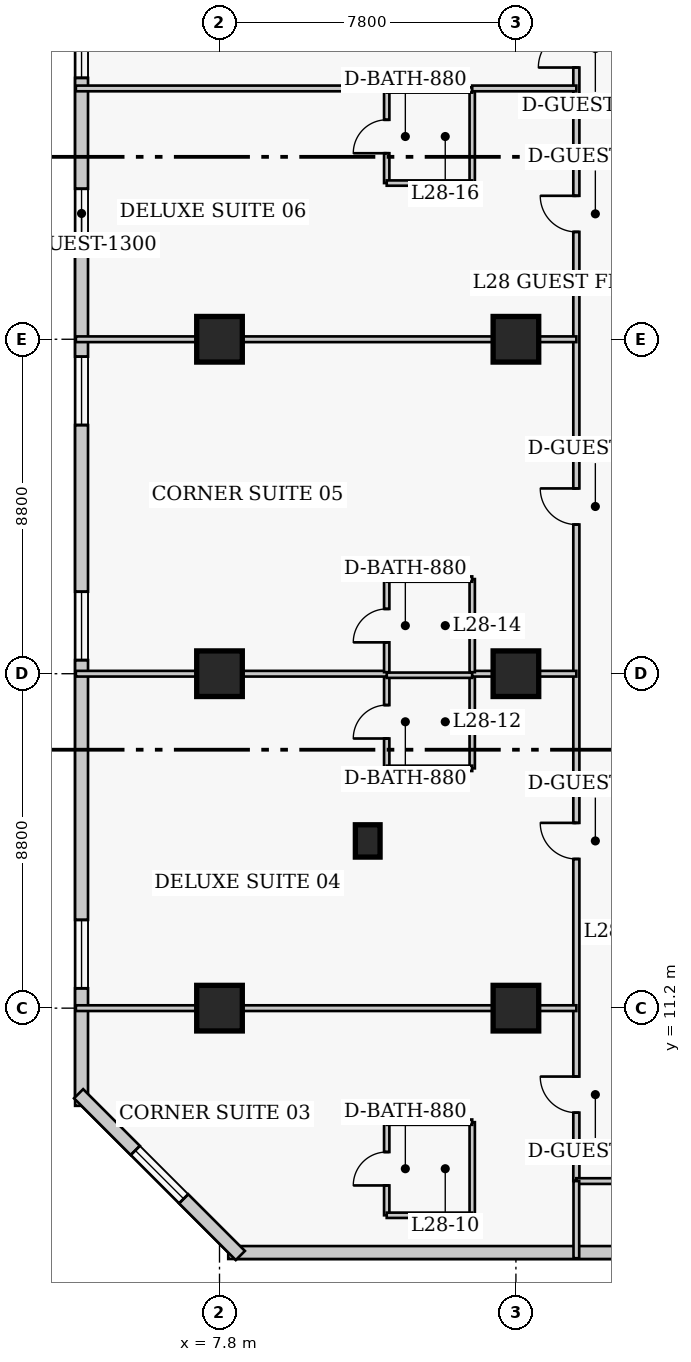
"""IFC4 building model, lengths in metres.
Left out: names, types, materials, properties, quantities, classifications, styles, units other than length and angle.
Written with IfcOpenShell. Run it as: python <this file> out.ifc"""

import sys

from ifc_helpers import new_model, si_unit, direction, frame, frame_2d, origin, origin_2d, place, context, subcontext, project, spatial, rectangle, extrude, element, fill, save


model = new_model("IFC4")
c1 = context("Model", 3, precision=1e-05, world=origin(), true_north=direction((0.0, 1.0)))
c2 = subcontext(c1, "Body", "Model", "MODEL_VIEW")
j1 = project(units=[si_unit("LENGTHUNIT", "METRE"), si_unit("PLANEANGLEUNIT", "RADIAN")], contexts=[c1])
p1 = place(None, origin())
s1 = spatial("IfcSite", under=j1, at=p1, CompositionType="ELEMENT")
p2 = place(p1, origin())
s2 = spatial("IfcBuilding", under=s1, at=p2, CompositionType="ELEMENT")
p3 = place(p2, frame((0.0, 0.0, 114.6)))
s3 = spatial("IfcBuildingStorey", under=s2, at=p3, CompositionType="ELEMENT", Elevation=114.6)
for number, where, z_axis, x_axis in (
    (1, (7.8, 11.2, 0.0), (0.0, 0.0, 1.0), (1.0, 0.0, 0.0)),
    (2, (7.8, 20.0, 0.0), (0.0, 0.0, 1.0), (1.0, 0.0, 0.0)),
    (3, (7.8, 28.8, 0.0), (0.0, 0.0, 1.0), (1.0, 0.0, 0.0)),
    (4, (15.6, 11.2, 0.0), (0.0, 0.0, 1.0), (1.0, 0.0, 0.0)),
    (5, (15.6, 20.0, 0.0), (0.0, 0.0, 1.0), (1.0, 0.0, 0.0)),
    (6, (15.6, 28.8, 0.0), (0.0, 0.0, 1.0), (1.0, 0.0, 0.0)),
):
    element("IfcColumn", number, at=place(p3, frame(where, z_axis=z_axis, x_axis=x_axis)), inside=s3, PredefinedType="COLUMN", context=c2, shape_type="SweptSolid", body=[
        extrude(rectangle(XDim=1.2, YDim=1.2, at=origin_2d()), origin(), (0.0, 0.0, 1.0), 3.8),
    ])
p4 = place(p3, frame((11.7, 15.6, 0.0), z_axis=(0.0, 0.0, 1.0), x_axis=(1.0, 0.0, 0.0)))
e7 = element("IfcColumn", 7, at=p4, inside=s3, PredefinedType="PILASTER", context=c2, shape_type="SweptSolid", body=[
    extrude(rectangle(XDim=0.65, YDim=0.85, at=origin_2d()), origin(), (0.0, 0.0, 1.0), 3.8),
])
p5 = place(p3, frame((8.03, 4.77, 0.0), z_axis=(0.0, 0.0, 1.0), x_axis=(1.0, 0.0, 0.0)))
e8 = element("IfcWall", 8, at=p5, inside=s3, PredefinedType="SOLIDWALL", context=c2, shape_type="SweptSolid", body=[
    extrude(rectangle(XDim=28.29, YDim=0.34, at=frame_2d((14.145, 0.0))), origin(), (0.0, 0.0, 1.0), 3.54),
])
p6 = place(p5, frame((12.595, 0.0, 0.85)))
e9 = element("IfcOpeningElement", 9, at=p6, cuts=e8, PredefinedType="OPENING", context=c2, shape_type="SweptSolid", body=[
    extrude(rectangle(XDim=1.8, YDim=1.8, at=frame_2d((0.9, 0.9))), frame((0.0, 0.18, 0.0), z_axis=(0.0, -1.0, 0.0), x_axis=(1.0, 0.0, 0.0)), (0.0, 0.0, 1.0), 0.36),
])
p7 = place(p3, frame((4.17, 40.57, 0.0), z_axis=(0.0, 0.0, 1.0), x_axis=(0.0, -1.0, 0.0)))
e10 = element("IfcWall", 10, at=p7, inside=s3, PredefinedType="SOLIDWALL", context=c2, shape_type="SweptSolid", body=[
    extrude(rectangle(XDim=31.94, YDim=0.34, at=frame_2d((15.97, 0.0))), origin(), (0.0, 0.0, 1.0), 3.54),
])
p8 = place(p7, frame((3.093, 0.0, 0.85)))
e11 = element("IfcOpeningElement", 11, at=p8, cuts=e10, PredefinedType="OPENING", context=c2, shape_type="SweptSolid", body=[
    extrude(rectangle(XDim=1.8, YDim=1.8, at=frame_2d((0.9, 0.9))), frame((0.0, 0.18, 0.0), z_axis=(0.0, -1.0, 0.0), x_axis=(1.0, 0.0, 0.0)), (0.0, 0.0, 1.0), 0.36),
])
p9 = place(p7, frame((12.228, 0.0, 0.85)))
e12 = element("IfcOpeningElement", 12, at=p9, cuts=e10, PredefinedType="OPENING", context=c2, shape_type="SweptSolid", body=[
    extrude(rectangle(XDim=1.8, YDim=1.8, at=frame_2d((0.9, 0.9))), frame((0.0, 0.18, 0.0), z_axis=(0.0, -1.0, 0.0), x_axis=(1.0, 0.0, 0.0)), (0.0, 0.0, 1.0), 0.36),
])
p10 = place(p7, frame((18.413, 0.0, 0.85)))
e13 = element("IfcOpeningElement", 13, at=p10, cuts=e10, PredefinedType="OPENING", context=c2, shape_type="SweptSolid", body=[
    extrude(rectangle(XDim=1.8, YDim=1.8, at=frame_2d((0.9, 0.9))), frame((0.0, 0.18, 0.0), z_axis=(0.0, -1.0, 0.0), x_axis=(1.0, 0.0, 0.0)), (0.0, 0.0, 1.0), 0.36),
])
p11 = place(p7, frame((27.048, 0.0, 0.85)))
e14 = element("IfcOpeningElement", 14, at=p11, cuts=e10, PredefinedType="OPENING", context=c2, shape_type="SweptSolid", body=[
    extrude(rectangle(XDim=1.8, YDim=1.8, at=frame_2d((0.9, 0.9))), frame((0.0, 0.18, 0.0), z_axis=(0.0, -1.0, 0.0), x_axis=(1.0, 0.0, 0.0)), (0.0, 0.0, 1.0), 0.36),
])
p12 = place(p7, frame((7.81, 0.0, 0.85)))
e15 = element("IfcOpeningElement", 15, at=p12, cuts=e10, PredefinedType="OPENING", context=c2, shape_type="SweptSolid", body=[
    extrude(rectangle(XDim=1.3, YDim=1.7, at=frame_2d((0.65, 0.85))), frame((0.0, 0.18, 0.0), z_axis=(0.0, -1.0, 0.0), x_axis=(1.0, 0.0, 0.0)), (0.0, 0.0, 1.0), 0.36),
])
p13 = place(p3, frame((4.092, 8.948, 0.0), z_axis=(0.0, 0.0, 1.0), x_axis=(0.707106781187, -0.707106781187, 0.0)))
e16 = element("IfcWall", 16, at=p13, inside=s3, PredefinedType="SOLIDWALL", context=c2, shape_type="SweptSolid", body=[
    extrude(rectangle(XDim=6.02, YDim=0.34, at=frame_2d((3.01, 0.0))), origin(), (0.0, 0.0, 1.0), 3.54),
])
p14 = place(p13, frame((2.11, 0.0, 0.85)))
e17 = element("IfcOpeningElement", 17, at=p14, cuts=e16, PredefinedType="OPENING", context=c2, shape_type="SweptSolid", body=[
    extrude(rectangle(XDim=1.8, YDim=1.8, at=frame_2d((0.9, 0.9))), frame((0.0, 0.18, 0.0), z_axis=(0.0, -1.0, 0.0), x_axis=(1.0, 0.0, 0.0)), (0.0, 0.0, 1.0), 0.36),
])
p15 = place(p3, frame((17.19, 6.65, 0.0), z_axis=(0.0, 0.0, 1.0), x_axis=(0.0, 1.0, 0.0)))
e18 = element("IfcWall", 18, at=p15, inside=s3, PredefinedType="PARTITIONING", context=c2, shape_type="SweptSolid", body=[
    extrude(rectangle(XDim=34.0, YDim=0.16, at=frame_2d((17.0, 0.0))), origin(), (0.0, 0.0, 1.0), 3.54),
])
p16 = place(p15, frame((1.8, 0.0, 0.0)))
e19 = element("IfcOpeningElement", 19, at=p16, cuts=e18, PredefinedType="OPENING", context=c2, shape_type="SweptSolid", body=[
    extrude(rectangle(XDim=0.95, YDim=2.1, at=frame_2d((0.475, 1.05))), frame((0.0, 0.09, 0.0), z_axis=(0.0, -1.0, 0.0), x_axis=(1.0, 0.0, 0.0)), (0.0, 0.0, 1.0), 0.18),
])
p17 = place(p15, frame((8.475, 0.0, 0.0)))
e20 = element("IfcOpeningElement", 20, at=p17, cuts=e18, PredefinedType="OPENING", context=c2, shape_type="SweptSolid", body=[
    extrude(rectangle(XDim=0.95, YDim=2.1, at=frame_2d((0.475, 1.05))), frame((0.0, 0.09, 0.0), z_axis=(0.0, -1.0, 0.0), x_axis=(1.0, 0.0, 0.0)), (0.0, 0.0, 1.0), 0.18),
])
p18 = place(p15, frame((17.275, 0.0, 0.0)))
e21 = element("IfcOpeningElement", 21, at=p18, cuts=e18, PredefinedType="OPENING", context=c2, shape_type="SweptSolid", body=[
    extrude(rectangle(XDim=0.95, YDim=2.1, at=frame_2d((0.475, 1.05))), frame((0.0, 0.09, 0.0), z_axis=(0.0, -1.0, 0.0), x_axis=(1.0, 0.0, 0.0)), (0.0, 0.0, 1.0), 0.18),
])
p19 = place(p15, frame((24.975, 0.0, 0.0)))
e22 = element("IfcOpeningElement", 22, at=p19, cuts=e18, PredefinedType="OPENING", context=c2, shape_type="SweptSolid", body=[
    extrude(rectangle(XDim=0.95, YDim=2.1, at=frame_2d((0.475, 1.05))), frame((0.0, 0.09, 0.0), z_axis=(0.0, -1.0, 0.0), x_axis=(1.0, 0.0, 0.0)), (0.0, 0.0, 1.0), 0.18),
])
p20 = place(p15, frame((29.3, 0.0, 0.0)))
e23 = element("IfcOpeningElement", 23, at=p20, cuts=e18, PredefinedType="OPENING", context=c2, shape_type="SweptSolid", body=[
    extrude(rectangle(XDim=1.0, YDim=2.15, at=frame_2d((0.5, 1.075))), frame((0.0, 0.09, 0.0), z_axis=(0.0, -1.0, 0.0), x_axis=(1.0, 0.0, 0.0)), (0.0, 0.0, 1.0), 0.18),
])
p21 = place(p3, frame((17.19, 6.65, 0.0), z_axis=(0.0, 0.0, 1.0), x_axis=(1.0, 0.0, 0.0)))
e24 = element("IfcWall", 24, at=p21, inside=s3, PredefinedType="PARTITIONING", context=c2, shape_type="SweptSolid", body=[
    extrude(rectangle(XDim=2.22, YDim=0.15, at=frame_2d((1.11, 0.0))), origin(), (0.0, 0.0, 1.0), 3.54),
])
p22 = place(p3, frame((17.19, 4.62, 0.0), z_axis=(0.0, 0.0, 1.0), x_axis=(0.0, 1.0, 0.0)))
e25 = element("IfcWall", 25, at=p22, inside=s3, PredefinedType="PARTITIONING", context=c2, shape_type="SweptSolid", body=[
    extrude(rectangle(XDim=2.03, YDim=0.15, at=frame_2d((1.015, 0.0))), origin(), (0.0, 0.0, 1.0), 3.54),
])
p23 = place(p3, frame((12.2, 5.75, 0.0), z_axis=(0.0, 0.0, 1.0), x_axis=(0.0, 1.0, 0.0)))
e26 = element("IfcWall", 26, at=p23, inside=s3, PredefinedType="PLUMBINGWALL", context=c2, shape_type="SweptSolid", body=[
    extrude(rectangle(XDim=2.45, YDim=0.14, at=frame_2d((1.225, 0.0))), origin(), (0.0, 0.0, 1.0), 3.54),
])
p24 = place(p23, frame((0.785, 0.0, 0.0)))
e27 = element("IfcOpeningElement", 27, at=p24, cuts=e26, PredefinedType="OPENING", context=c2, shape_type="SweptSolid", body=[
    extrude(rectangle(XDim=0.88, YDim=2.05, at=frame_2d((0.44, 1.025))), frame((0.0, 0.08, 0.0), z_axis=(0.0, -1.0, 0.0), x_axis=(1.0, 0.0, 0.0)), (0.0, 0.0, 1.0), 0.16),
])
p25 = place(p3, frame((14.45, 5.75, 0.0), z_axis=(0.0, 0.0, 1.0), x_axis=(0.0, 1.0, 0.0)))
e28 = element("IfcWall", 28, at=p25, inside=s3, PredefinedType="PLUMBINGWALL", context=c2, shape_type="SweptSolid", body=[
    extrude(rectangle(XDim=2.45, YDim=0.14, at=frame_2d((1.225, 0.0))), origin(), (0.0, 0.0, 1.0), 3.54),
])
for number, where, z_axis, x_axis in (
    (29, (12.2, 5.75, 0.0), (0.0, 0.0, 1.0), (1.0, 0.0, 0.0)),
    (30, (12.2, 8.2, 0.0), (0.0, 0.0, 1.0), (1.0, 0.0, 0.0)),
):
    element("IfcWall", number, at=place(p3, frame(where, z_axis=z_axis, x_axis=x_axis)), inside=s3, PredefinedType="PLUMBINGWALL", context=c2, shape_type="SweptSolid", body=[
        extrude(rectangle(XDim=2.25, YDim=0.14, at=frame_2d((1.125, 0.0))), origin(), (0.0, 0.0, 1.0), 3.54),
    ])
p26 = place(p3, frame((4.02, 11.2, 0.0), z_axis=(0.0, 0.0, 1.0), x_axis=(1.0, 0.0, 0.0)))
e31 = element("IfcWall", 31, at=p26, inside=s3, PredefinedType="PARTITIONING", context=c2, shape_type="SweptSolid", body=[
    extrude(rectangle(XDim=13.17, YDim=0.15, at=frame_2d((6.585, 0.0))), origin(), (0.0, 0.0, 1.0), 2.679),
])
p27 = place(p3, frame((12.2, 17.51, 0.0), z_axis=(0.0, 0.0, 1.0), x_axis=(0.0, 1.0, 0.0)))
e32 = element("IfcWall", 32, at=p27, inside=s3, PredefinedType="PLUMBINGWALL", context=c2, shape_type="SweptSolid", body=[
    extrude(rectangle(XDim=2.45, YDim=0.14, at=frame_2d((1.225, 0.0))), origin(), (0.0, 0.0, 1.0), 3.54),
])
p28 = place(p27, frame((0.785, 0.0, 0.0)))
e33 = element("IfcOpeningElement", 33, at=p28, cuts=e32, PredefinedType="OPENING", context=c2, shape_type="SweptSolid", body=[
    extrude(rectangle(XDim=0.88, YDim=2.05, at=frame_2d((0.44, 1.025))), frame((0.0, 0.08, 0.0), z_axis=(0.0, -1.0, 0.0), x_axis=(1.0, 0.0, 0.0)), (0.0, 0.0, 1.0), 0.16),
])
p29 = place(p3, frame((14.45, 17.51, 0.0), z_axis=(0.0, 0.0, 1.0), x_axis=(0.0, 1.0, 0.0)))
e34 = element("IfcWall", 34, at=p29, inside=s3, PredefinedType="PLUMBINGWALL", context=c2, shape_type="SweptSolid", body=[
    extrude(rectangle(XDim=2.45, YDim=0.14, at=frame_2d((1.225, 0.0))), origin(), (0.0, 0.0, 1.0), 3.54),
])
p30 = place(p3, frame((12.2, 17.51, 0.0), z_axis=(0.0, 0.0, 1.0), x_axis=(1.0, 0.0, 0.0)))
e35 = element("IfcWall", 35, at=p30, inside=s3, PredefinedType="PLUMBINGWALL", context=c2, shape_type="SweptSolid", body=[
    extrude(rectangle(XDim=2.25, YDim=0.14, at=frame_2d((1.125, 0.0))), origin(), (0.0, 0.0, 1.0), 3.54),
])
p31 = place(p3, frame((12.2, 19.96, 0.0), z_axis=(0.0, 0.0, 1.0), x_axis=(1.0, 0.0, 0.0)))
e36 = element("IfcWall", 36, at=p31, inside=s3, PredefinedType="PLUMBINGWALL", context=c2, shape_type="SweptSolid", body=[
    extrude(rectangle(XDim=2.25, YDim=0.14, at=frame_2d((1.125, 0.0))), origin(), (0.0, 0.0, 1.0), 2.679),
])
p32 = place(p3, frame((4.02, 20.0, 0.0), z_axis=(0.0, 0.0, 1.0), x_axis=(1.0, 0.0, 0.0)))
e37 = element("IfcWall", 37, at=p32, inside=s3, PredefinedType="PARTITIONING", context=c2, shape_type="SweptSolid", body=[
    extrude(rectangle(XDim=8.18, YDim=0.15, at=frame_2d((4.09, 0.0))), origin(), (0.0, 0.0, 1.0), 2.679),
])
p33 = place(p3, frame((14.45, 20.0, 0.0), z_axis=(0.0, 0.0, 1.0), x_axis=(1.0, 0.0, 0.0)))
e38 = element("IfcWall", 38, at=p33, inside=s3, PredefinedType="PARTITIONING", context=c2, shape_type="SweptSolid", body=[
    extrude(rectangle(XDim=2.74, YDim=0.15, at=frame_2d((1.37, 0.0))), origin(), (0.0, 0.0, 1.0), 2.679),
])
p34 = place(p3, frame((12.2, 20.04, 0.0), z_axis=(0.0, 0.0, 1.0), x_axis=(0.0, 1.0, 0.0)))
e39 = element("IfcWall", 39, at=p34, inside=s3, PredefinedType="PLUMBINGWALL", context=c2, shape_type="SweptSolid", body=[
    extrude(rectangle(XDim=2.45, YDim=0.14, at=frame_2d((1.225, 0.0))), origin(), (0.0, 0.0, 1.0), 3.54),
])
p35 = place(p34, frame((0.785, 0.0, 0.0)))
e40 = element("IfcOpeningElement", 40, at=p35, cuts=e39, PredefinedType="OPENING", context=c2, shape_type="SweptSolid", body=[
    extrude(rectangle(XDim=0.88, YDim=2.05, at=frame_2d((0.44, 1.025))), frame((0.0, 0.08, 0.0), z_axis=(0.0, -1.0, 0.0), x_axis=(1.0, 0.0, 0.0)), (0.0, 0.0, 1.0), 0.16),
])
p36 = place(p3, frame((14.45, 20.04, 0.0), z_axis=(0.0, 0.0, 1.0), x_axis=(0.0, 1.0, 0.0)))
e41 = element("IfcWall", 41, at=p36, inside=s3, PredefinedType="PLUMBINGWALL", context=c2, shape_type="SweptSolid", body=[
    extrude(rectangle(XDim=2.45, YDim=0.14, at=frame_2d((1.225, 0.0))), origin(), (0.0, 0.0, 1.0), 3.54),
])
p37 = place(p3, frame((12.2, 22.49, 0.0), z_axis=(0.0, 0.0, 1.0), x_axis=(1.0, 0.0, 0.0)))
e42 = element("IfcWall", 42, at=p37, inside=s3, PredefinedType="PLUMBINGWALL", context=c2, shape_type="SweptSolid", body=[
    extrude(rectangle(XDim=2.25, YDim=0.14, at=frame_2d((1.125, 0.0))), origin(), (0.0, 0.0, 1.0), 3.54),
])
p38 = place(p3, frame((4.02, 28.8, 0.0), z_axis=(0.0, 0.0, 1.0), x_axis=(1.0, 0.0, 0.0)))
e43 = element("IfcWall", 43, at=p38, inside=s3, PredefinedType="PARTITIONING", context=c2, shape_type="SweptSolid", body=[
    extrude(rectangle(XDim=13.17, YDim=0.15, at=frame_2d((6.585, 0.0))), origin(), (0.0, 0.0, 1.0), 2.679),
])
p39 = place(p3, frame((12.2, 32.91, 0.0), z_axis=(0.0, 0.0, 1.0), x_axis=(0.0, 1.0, 0.0)))
e44 = element("IfcWall", 44, at=p39, inside=s3, PredefinedType="PLUMBINGWALL", context=c2, shape_type="SweptSolid", body=[
    extrude(rectangle(XDim=2.45, YDim=0.14, at=frame_2d((1.225, 0.0))), origin(), (0.0, 0.0, 1.0), 3.54),
])
p40 = place(p39, frame((0.785, 0.0, 0.0)))
e45 = element("IfcOpeningElement", 45, at=p40, cuts=e44, PredefinedType="OPENING", context=c2, shape_type="SweptSolid", body=[
    extrude(rectangle(XDim=0.88, YDim=2.05, at=frame_2d((0.44, 1.025))), frame((0.0, 0.08, 0.0), z_axis=(0.0, -1.0, 0.0), x_axis=(1.0, 0.0, 0.0)), (0.0, 0.0, 1.0), 0.16),
])
p41 = place(p3, frame((14.45, 32.91, 0.0), z_axis=(0.0, 0.0, 1.0), x_axis=(0.0, 1.0, 0.0)))
e46 = element("IfcWall", 46, at=p41, inside=s3, PredefinedType="PLUMBINGWALL", context=c2, shape_type="SweptSolid", body=[
    extrude(rectangle(XDim=2.45, YDim=0.14, at=frame_2d((1.225, 0.0))), origin(), (0.0, 0.0, 1.0), 3.54),
])
for number, where, z_axis, x_axis in (
    (47, (12.2, 32.91, 0.0), (0.0, 0.0, 1.0), (1.0, 0.0, 0.0)),
    (48, (12.2, 35.36, 0.0), (0.0, 0.0, 1.0), (1.0, 0.0, 0.0)),
):
    element("IfcWall", number, at=place(p3, frame(where, z_axis=z_axis, x_axis=x_axis)), inside=s3, PredefinedType="PLUMBINGWALL", context=c2, shape_type="SweptSolid", body=[
        extrude(rectangle(XDim=2.25, YDim=0.14, at=frame_2d((1.125, 0.0))), origin(), (0.0, 0.0, 1.0), 3.54),
    ])
p42 = place(p3, frame((4.02, 35.4, 0.0), z_axis=(0.0, 0.0, 1.0), x_axis=(1.0, 0.0, 0.0)))
e49 = element("IfcWall", 49, at=p42, inside=s3, PredefinedType="PARTITIONING", context=c2, shape_type="SweptSolid", body=[
    extrude(rectangle(XDim=8.18, YDim=0.15, at=frame_2d((4.09, 0.0))), origin(), (0.0, 0.0, 1.0), 3.54),
])
p43 = place(p3, frame((14.45, 35.4, 0.0), z_axis=(0.0, 0.0, 1.0), x_axis=(1.0, 0.0, 0.0)))
e50 = element("IfcWall", 50, at=p43, inside=s3, PredefinedType="PARTITIONING", context=c2, shape_type="SweptSolid", body=[
    extrude(rectangle(XDim=2.74, YDim=0.15, at=frame_2d((1.37, 0.0))), origin(), (0.0, 0.0, 1.0), 3.54),
])
p44 = place(p8, origin())
e51 = element("IfcWindow", 51, at=p44, inside=s3, PartitioningType="SINGLE_PANEL", PredefinedType="WINDOW", context=c2, shape_type="SweptSolid", body=[
    extrude(rectangle(XDim=1.8, YDim=1.8, at=frame_2d((0.9, 0.9))), frame((0.0, 0.03, 0.0), z_axis=(0.0, -1.0, 0.0), x_axis=(1.0, 0.0, 0.0)), (0.0, 0.0, 1.0), 0.06),
])
fill(e11, e51)
p45 = place(p9, origin())
e52 = element("IfcWindow", 52, at=p45, inside=s3, PartitioningType="SINGLE_PANEL", PredefinedType="WINDOW", context=c2, shape_type="SweptSolid", body=[
    extrude(rectangle(XDim=1.8, YDim=1.8, at=frame_2d((0.9, 0.9))), frame((0.0, 0.03, 0.0), z_axis=(0.0, -1.0, 0.0), x_axis=(1.0, 0.0, 0.0)), (0.0, 0.0, 1.0), 0.06),
])
fill(e12, e52)
p46 = place(p10, origin())
e53 = element("IfcWindow", 53, at=p46, inside=s3, PartitioningType="SINGLE_PANEL", PredefinedType="WINDOW", context=c2, shape_type="SweptSolid", body=[
    extrude(rectangle(XDim=1.8, YDim=1.8, at=frame_2d((0.9, 0.9))), frame((0.0, 0.03, 0.0), z_axis=(0.0, -1.0, 0.0), x_axis=(1.0, 0.0, 0.0)), (0.0, 0.0, 1.0), 0.06),
])
fill(e13, e53)
p47 = place(p11, origin())
e54 = element("IfcWindow", 54, at=p47, inside=s3, PartitioningType="SINGLE_PANEL", PredefinedType="WINDOW", context=c2, shape_type="SweptSolid", body=[
    extrude(rectangle(XDim=1.8, YDim=1.8, at=frame_2d((0.9, 0.9))), frame((0.0, 0.03, 0.0), z_axis=(0.0, -1.0, 0.0), x_axis=(1.0, 0.0, 0.0)), (0.0, 0.0, 1.0), 0.06),
])
fill(e14, e54)
p48 = place(p14, origin())
e55 = element("IfcWindow", 55, at=p48, inside=s3, PartitioningType="SINGLE_PANEL", PredefinedType="WINDOW", context=c2, shape_type="SweptSolid", body=[
    extrude(rectangle(XDim=1.8, YDim=1.8, at=frame_2d((0.9, 0.9))), frame((0.0, 0.03, 0.0), z_axis=(0.0, -1.0, 0.0), x_axis=(1.0, 0.0, 0.0)), (0.0, 0.0, 1.0), 0.06),
])
fill(e17, e55)
p49 = place(p12, origin())
e56 = element("IfcWindow", 56, at=p49, inside=s3, PartitioningType="SINGLE_PANEL", PredefinedType="WINDOW", context=c2, shape_type="SweptSolid", body=[
    extrude(rectangle(XDim=1.3, YDim=1.7, at=frame_2d((0.65, 0.85))), frame((0.0, 0.03, 0.0), z_axis=(0.0, -1.0, 0.0), x_axis=(1.0, 0.0, 0.0)), (0.0, 0.0, 1.0), 0.06),
])
fill(e15, e56)
p50 = place(p24, origin())
e57 = element("IfcDoor", 57, at=p50, inside=s3, OperationType="SINGLE_SWING_LEFT", PredefinedType="DOOR", context=c2, shape_type="SweptSolid", body=[
    extrude(rectangle(XDim=0.88, YDim=2.05, at=frame_2d((0.44, 1.025))), frame((0.0, 0.025, 0.0), z_axis=(0.0, -1.0, 0.0), x_axis=(1.0, 0.0, 0.0)), (0.0, 0.0, 1.0), 0.05),
])
fill(e27, e57)
p51 = place(p16, origin())
e58 = element("IfcDoor", 58, at=p51, inside=s3, OperationType="SINGLE_SWING_RIGHT", PredefinedType="DOOR", context=c2, shape_type="SweptSolid", body=[
    extrude(rectangle(XDim=0.95, YDim=2.1, at=frame_2d((0.475, 1.05))), frame((0.0, 0.025, 0.0), z_axis=(0.0, -1.0, 0.0), x_axis=(1.0, 0.0, 0.0)), (0.0, 0.0, 1.0), 0.05),
])
fill(e19, e58)
p52 = place(p28, origin())
e59 = element("IfcDoor", 59, at=p52, inside=s3, OperationType="SINGLE_SWING_LEFT", PredefinedType="DOOR", context=c2, shape_type="SweptSolid", body=[
    extrude(rectangle(XDim=0.88, YDim=2.05, at=frame_2d((0.44, 1.025))), frame((0.0, 0.025, 0.0), z_axis=(0.0, -1.0, 0.0), x_axis=(1.0, 0.0, 0.0)), (0.0, 0.0, 1.0), 0.05),
])
fill(e33, e59)
p53 = place(p17, origin())
e60 = element("IfcDoor", 60, at=p53, inside=s3, OperationType="SINGLE_SWING_RIGHT", PredefinedType="DOOR", context=c2, shape_type="SweptSolid", body=[
    extrude(rectangle(XDim=0.95, YDim=2.1, at=frame_2d((0.475, 1.05))), frame((0.0, 0.025, 0.0), z_axis=(0.0, -1.0, 0.0), x_axis=(1.0, 0.0, 0.0)), (0.0, 0.0, 1.0), 0.05),
])
fill(e20, e60)
p54 = place(p35, origin())
e61 = element("IfcDoor", 61, at=p54, inside=s3, OperationType="SINGLE_SWING_LEFT", PredefinedType="DOOR", context=c2, shape_type="SweptSolid", body=[
    extrude(rectangle(XDim=0.88, YDim=2.05, at=frame_2d((0.44, 1.025))), frame((0.0, 0.025, 0.0), z_axis=(0.0, -1.0, 0.0), x_axis=(1.0, 0.0, 0.0)), (0.0, 0.0, 1.0), 0.05),
])
fill(e40, e61)
p55 = place(p18, origin())
e62 = element("IfcDoor", 62, at=p55, inside=s3, OperationType="SINGLE_SWING_RIGHT", PredefinedType="DOOR", context=c2, shape_type="SweptSolid", body=[
    extrude(rectangle(XDim=0.95, YDim=2.1, at=frame_2d((0.475, 1.05))), frame((0.0, 0.025, 0.0), z_axis=(0.0, -1.0, 0.0), x_axis=(1.0, 0.0, 0.0)), (0.0, 0.0, 1.0), 0.05),
])
fill(e21, e62)
p56 = place(p40, origin())
e63 = element("IfcDoor", 63, at=p56, inside=s3, OperationType="SINGLE_SWING_LEFT", PredefinedType="DOOR", context=c2, shape_type="SweptSolid", body=[
    extrude(rectangle(XDim=0.88, YDim=2.05, at=frame_2d((0.44, 1.025))), frame((0.0, 0.025, 0.0), z_axis=(0.0, -1.0, 0.0), x_axis=(1.0, 0.0, 0.0)), (0.0, 0.0, 1.0), 0.05),
])
fill(e45, e63)
p57 = place(p19, origin())
e64 = element("IfcDoor", 64, at=p57, inside=s3, OperationType="SINGLE_SWING_RIGHT", PredefinedType="DOOR", context=c2, shape_type="SweptSolid", body=[
    extrude(rectangle(XDim=0.95, YDim=2.1, at=frame_2d((0.475, 1.05))), frame((0.0, 0.025, 0.0), z_axis=(0.0, -1.0, 0.0), x_axis=(1.0, 0.0, 0.0)), (0.0, 0.0, 1.0), 0.05),
])
fill(e22, e64)
p58 = place(p20, origin())
e65 = element("IfcDoor", 65, at=p58, inside=s3, OperationType="SINGLE_SWING_LEFT", PredefinedType="DOOR", context=c2, shape_type="SweptSolid", body=[
    extrude(rectangle(XDim=1.0, YDim=2.15, at=frame_2d((0.5, 1.075))), frame((0.0, 0.025, 0.0), z_axis=(0.0, -1.0, 0.0), x_axis=(1.0, 0.0, 0.0)), (0.0, 0.0, 1.0), 0.05),
])
fill(e23, e65)
save(model, sys.argv[1])
